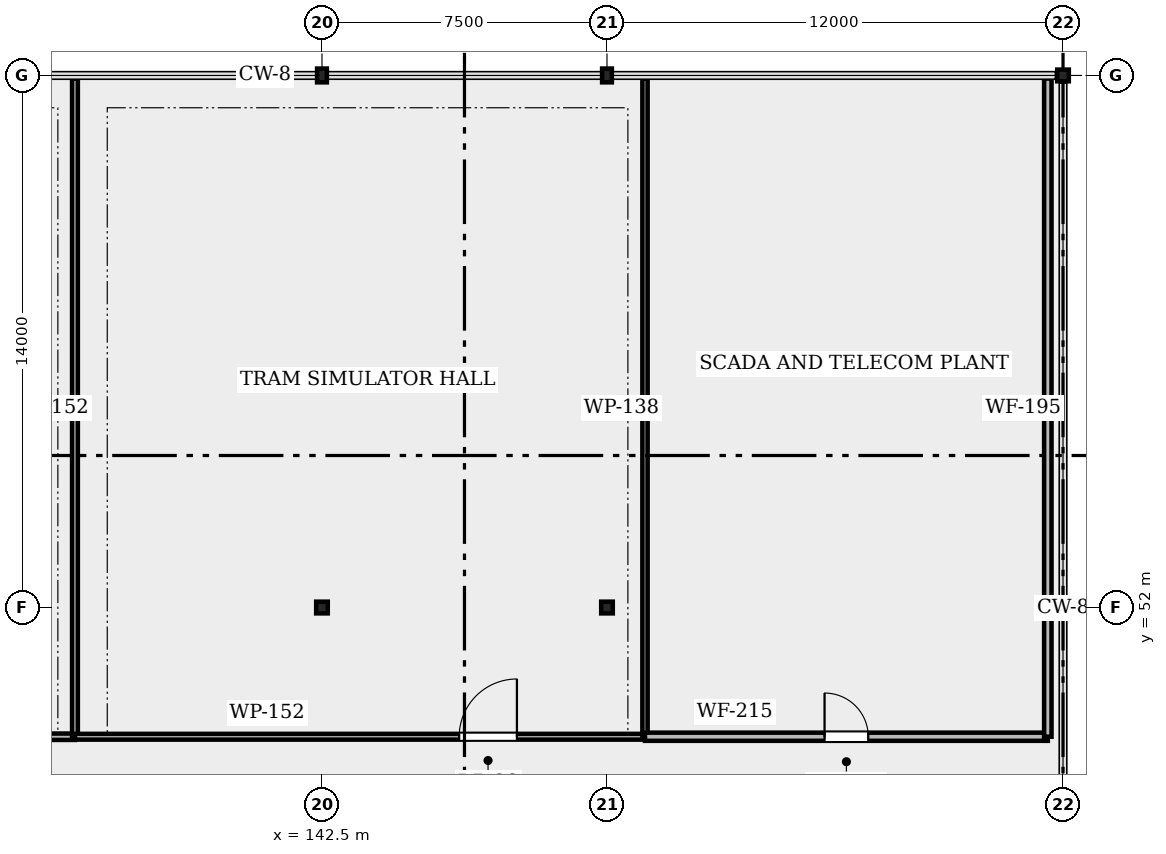
"""IFC4 building model, lengths in metres.
Left out: names, types, materials, properties, quantities, classifications, styles, units other than length and angle.
Written with IfcOpenShell. Run it as: python <this file> out.ifc"""

import sys

from ifc_helpers import new_model, si_unit, direction, frame, frame_2d, origin, origin_2d, place, context, subcontext, project, spatial, rectangle, i_section, extrude, element, fill, save


model = new_model("IFC4")
c1 = context("Model", 3, precision=1e-05, world=origin(), true_north=direction((0.0, 1.0)))
c2 = subcontext(c1, "Body", "Model", "MODEL_VIEW")
j1 = project(units=[si_unit("LENGTHUNIT", "METRE"), si_unit("PLANEANGLEUNIT", "RADIAN")], contexts=[c1])
p1 = place(None, origin())
s1 = spatial("IfcSite", under=j1, at=p1, CompositionType="ELEMENT")
p2 = place(p1, origin())
s2 = spatial("IfcBuilding", under=s1, at=p2, CompositionType="ELEMENT")
p3 = place(p2, frame((0.0, 0.0, 13.5)))
s3 = spatial("IfcBuildingStorey", under=s2, at=p3, CompositionType="ELEMENT", Elevation=13.5)
p4 = place(p3, frame((142.5, 52.0, 0.0), z_axis=(0.0, 0.0, 1.0), x_axis=(1.0, 0.0, 0.0)))
e1 = element("IfcColumn", 1, at=p4, inside=s3, PredefinedType="COLUMN", context=c2, shape_type="SweptSolid", body=[
    extrude(i_section(OverallWidth=0.305, OverallDepth=0.308, WebThickness=0.01, FlangeThickness=0.015, FilletRadius=0.015, at=origin_2d()), origin(), (0.0, 0.0, 1.0), 4.26),
])
p5 = place(p3, frame((142.5, 66.0, 0.0), z_axis=(0.0, 0.0, 1.0), x_axis=(1.0, 0.0, 0.0)))
e2 = element("IfcColumn", 2, at=p5, inside=s3, PredefinedType="COLUMN", context=c2, shape_type="SweptSolid", body=[
    extrude(i_section(OverallWidth=0.257, OverallDepth=0.363, WebThickness=0.013, FlangeThickness=0.022, FilletRadius=0.015, at=origin_2d()), origin(), (0.0, 0.0, 1.0), 4.76),
])
p6 = place(p3, frame((150.0, 52.0, 0.0), z_axis=(0.0, 0.0, 1.0), x_axis=(1.0, 0.0, 0.0)))
e3 = element("IfcColumn", 3, at=p6, inside=s3, PredefinedType="COLUMN", context=c2, shape_type="SweptSolid", body=[
    extrude(i_section(OverallWidth=0.305, OverallDepth=0.308, WebThickness=0.01, FlangeThickness=0.015, FilletRadius=0.015, at=origin_2d()), origin(), (0.0, 0.0, 1.0), 4.26),
])
p7 = place(p3, frame((150.0, 66.0, 0.0), z_axis=(0.0, 0.0, 1.0), x_axis=(1.0, 0.0, 0.0)))
e4 = element("IfcColumn", 4, at=p7, inside=s3, PredefinedType="COLUMN", context=c2, shape_type="SweptSolid", body=[
    extrude(i_section(OverallWidth=0.257, OverallDepth=0.363, WebThickness=0.013, FlangeThickness=0.022, FilletRadius=0.015, at=origin_2d()), origin(), (0.0, 0.0, 1.0), 4.76),
])
p8 = place(p3, frame((162.0, 52.0, 0.0), z_axis=(0.0, 0.0, 1.0), x_axis=(1.0, 0.0, 0.0)))
e5 = element("IfcColumn", 5, at=p8, inside=s3, PredefinedType="COLUMN", context=c2, shape_type="SweptSolid", body=[
    extrude(i_section(OverallWidth=0.305, OverallDepth=0.308, WebThickness=0.01, FlangeThickness=0.015, FilletRadius=0.015, at=origin_2d()), origin(), (0.0, 0.0, 1.0), 4.26),
])
p9 = place(p3, frame((162.0, 66.0, 0.0), z_axis=(0.0, 0.0, 1.0), x_axis=(1.0, 0.0, 0.0)))
e6 = element("IfcColumn", 6, at=p9, inside=s3, PredefinedType="COLUMN", context=c2, shape_type="SweptSolid", body=[
    extrude(i_section(OverallWidth=0.305, OverallDepth=0.308, WebThickness=0.01, FlangeThickness=0.015, FilletRadius=0.015, at=origin_2d()), origin(), (0.0, 0.0, 1.0), 4.76),
])
p10 = place(p3, frame((120.16, 48.6, 0.0), z_axis=(0.0, 0.0, 1.0), x_axis=(1.0, 0.0, 0.0)))
e7 = element("IfcWall", 7, at=p10, inside=s3, PredefinedType="PARTITIONING", context=c2, shape_type="SweptSolid", body=[
    extrude(rectangle(XDim=15.84, YDim=0.168, at=frame_2d((7.92, 0.0))), origin(), (0.0, 0.0, 1.0), 3.7),
])
p11 = place(p10, frame((10.785, 0.0, 0.0)))
e8 = element("IfcOpeningElement", 8, at=p11, cuts=e7, PredefinedType="OPENING", context=c2, shape_type="SweptSolid", body=[
    extrude(rectangle(XDim=1.46, YDim=2.2, at=frame_2d((0.73, 1.1))), frame((0.0, 0.094, 0.0), z_axis=(0.0, -1.0, 0.0), x_axis=(1.0, 0.0, 0.0)), (0.0, 0.0, 1.0), 0.188),
])
p12 = place(p3, frame((136.0, 48.6, 0.0), z_axis=(0.0, 0.0, 1.0), x_axis=(0.0, 1.0, 0.0)))
e9 = element("IfcWall", 9, at=p12, inside=s3, PredefinedType="PARTITIONING", context=c2, shape_type="SweptSolid", body=[
    extrude(rectangle(XDim=17.32, YDim=0.152, at=frame_2d((8.66, 0.0))), origin(), (0.0, 0.0, 1.0), 3.7),
])
p13 = place(p3, frame((136.0, 48.6, 0.0), z_axis=(0.0, 0.0, 1.0), x_axis=(1.0, 0.0, 0.0)))
e10 = element("IfcWall", 10, at=p13, inside=s3, PredefinedType="PARTITIONING", context=c2, shape_type="SweptSolid", body=[
    extrude(rectangle(XDim=15.0, YDim=0.152, at=frame_2d((7.5, 0.0))), origin(), (0.0, 0.0, 1.0), 3.7),
])
p14 = place(p13, frame((10.11, 0.0, 0.0)))
e11 = element("IfcOpeningElement", 11, at=p14, cuts=e10, PredefinedType="OPENING", context=c2, shape_type="SweptSolid", body=[
    extrude(rectangle(XDim=1.52, YDim=2.18, at=frame_2d((0.76, 1.09))), frame((0.0, 0.086, 0.0), z_axis=(0.0, -1.0, 0.0), x_axis=(1.0, 0.0, 0.0)), (0.0, 0.0, 1.0), 0.172),
])
p15 = place(p3, frame((151.0, 48.6, 0.0), z_axis=(0.0, 0.0, 1.0), x_axis=(0.0, 1.0, 0.0)))
e12 = element("IfcWall", 12, at=p15, inside=s3, PredefinedType="PARTITIONING", context=c2, shape_type="SweptSolid", body=[
    extrude(rectangle(XDim=17.32, YDim=0.138, at=frame_2d((8.66, 0.0))), origin(), (0.0, 0.0, 1.0), 3.7),
])
p16 = place(p3, frame((151.0, 48.6, 0.0), z_axis=(0.0, 0.0, 1.0), x_axis=(1.0, 0.0, 0.0)))
e13 = element("IfcWall", 13, at=p16, inside=s3, PredefinedType="PARTITIONING", context=c2, shape_type="SweptSolid", body=[
    extrude(rectangle(XDim=10.6, YDim=0.215, at=frame_2d((5.3, 0.0))), origin(), (0.0, 0.0, 1.0), 3.7),
])
p17 = place(p16, frame((4.725, 0.0, 0.0)))
e14 = element("IfcOpeningElement", 14, at=p17, cuts=e13, PredefinedType="OPENING", context=c2, shape_type="SweptSolid", body=[
    extrude(rectangle(XDim=1.15, YDim=2.15, at=frame_2d((0.575, 1.075))), frame((0.0, 0.117, 0.0), z_axis=(0.0, -1.0, 0.0), x_axis=(1.0, 0.0, 0.0)), (0.0, 0.0, 1.0), 0.235),
])
p18 = place(p3, frame((161.6, 48.6, 0.0), z_axis=(0.0, 0.0, 1.0), x_axis=(0.0, 1.0, 0.0)))
e15 = element("IfcWall", 15, at=p18, inside=s3, PredefinedType="PARTITIONING", context=c2, shape_type="SweptSolid", body=[
    extrude(rectangle(XDim=17.32, YDim=0.195, at=frame_2d((8.66, 0.0))), origin(), (0.0, 0.0, 1.0), 3.7),
])
p19 = place(p14, origin())
e16 = element("IfcDoor", 16, at=p19, inside=s3, OperationType="SINGLE_SWING_RIGHT", PredefinedType="DOOR", context=c2, shape_type="SweptSolid", body=[
    extrude(rectangle(XDim=1.52, YDim=2.18, at=frame_2d((0.76, 1.09))), frame((0.0, 0.025, 0.0), z_axis=(0.0, -1.0, 0.0), x_axis=(1.0, 0.0, 0.0)), (0.0, 0.0, 1.0), 0.05),
])
fill(e11, e16)
p20 = place(p17, origin())
e17 = element("IfcDoor", 17, at=p20, inside=s3, OperationType="SINGLE_SWING_LEFT", PredefinedType="DOOR", context=c2, shape_type="SweptSolid", body=[
    extrude(rectangle(XDim=1.15, YDim=2.15, at=frame_2d((0.575, 1.075))), frame((0.0, 0.025, 0.0), z_axis=(0.0, -1.0, 0.0), x_axis=(1.0, 0.0, 0.0)), (0.0, 0.0, 1.0), 0.05),
])
fill(e14, e17)
save(model, sys.argv[1])
